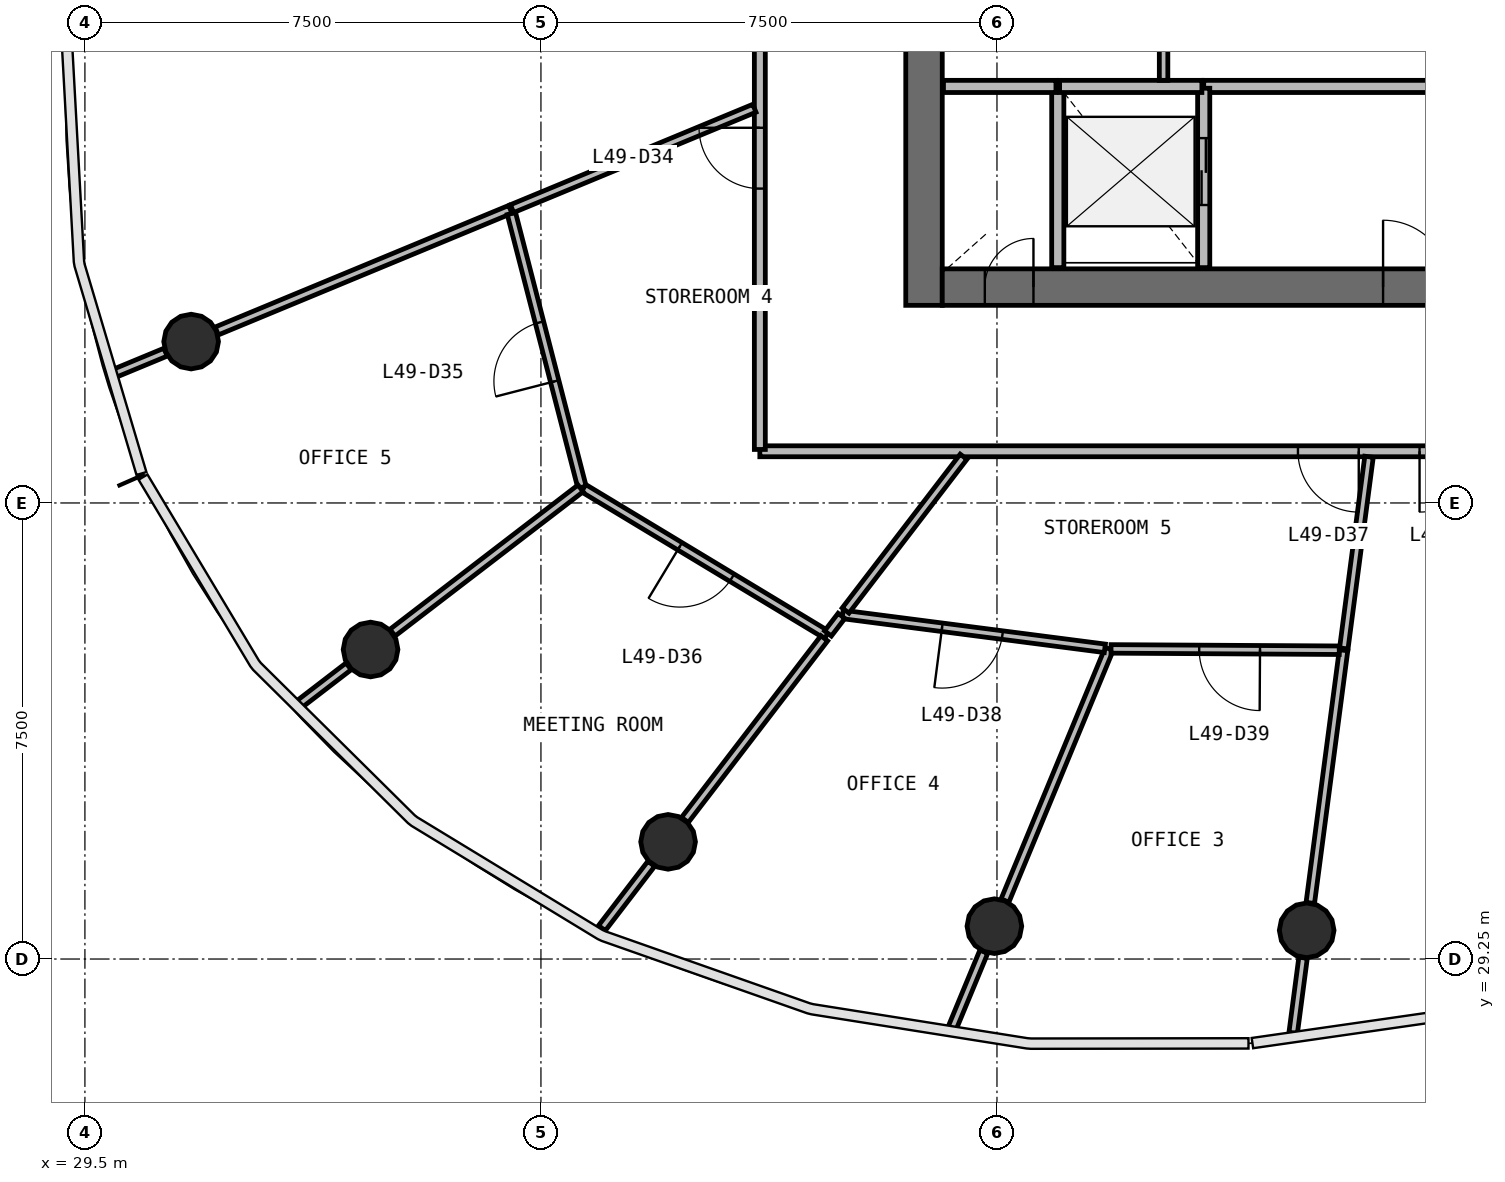
"""IFC4 building model, lengths in metres.
Left out: names, types, materials, properties, quantities, classifications, styles, units other than length and angle.
Written with IfcOpenShell. Run it as: python <this file> out.ifc"""

import sys

from ifc_helpers import new_model, si_unit, direction, frame, frame_2d, origin, origin_2d, place, context, subcontext, project, spatial, rectangle, circle, extrude, source, transform, mapped, element, fill, save


model = new_model("IFC4")
c1 = context("Model", 3, precision=1e-05, world=origin(), true_north=direction((0.0, 1.0)))
c2 = subcontext(c1, "Body", "Model", "MODEL_VIEW")
j1 = project(units=[si_unit("LENGTHUNIT", "METRE"), si_unit("PLANEANGLEUNIT", "RADIAN")], contexts=[c1])
p1 = place(None, origin())
s1 = spatial("IfcSite", under=j1, at=p1, CompositionType="ELEMENT")
p2 = place(p1, origin())
s2 = spatial("IfcBuilding", under=s1, at=p2, CompositionType="ELEMENT")
p3 = place(p2, frame((0.0, 0.0, 203.3)))
s3 = spatial("IfcBuildingStorey", under=s2, at=p3, CompositionType="ELEMENT", Elevation=203.3)
p4 = place(p3, frame((43.3, 56.0, 0.0), z_axis=(0.0, 0.0, 1.0), x_axis=(0.0, -1.0, 0.0)))
e1 = element("IfcWall", 1, at=p4, inside=s3, PredefinedType="SHEAR", context=c2, shape_type="SweptSolid", body=[
    extrude(rectangle(XDim=16.0, YDim=0.6, at=frame_2d((8.0, 0.0))), origin(), (0.0, 0.0, 1.0), 3.9),
])
p5 = place(p4, frame((7.1, 0.0, 0.0)))
e2 = element("IfcOpeningElement", 2, at=p5, cuts=e1, PredefinedType="OPENING", context=c2, shape_type="SweptSolid", body=[
    extrude(rectangle(XDim=1.8, YDim=2.1, at=frame_2d((0.9, 1.05))), frame((0.0, 0.31, 0.0), z_axis=(0.0, -1.0, 0.0), x_axis=(1.0, 0.0, 0.0)), (0.0, 0.0, 1.0), 0.62),
])
p6 = place(p3, frame((43.6, 40.3, 0.0), z_axis=(0.0, 0.0, 1.0), x_axis=(1.0, 0.0, 0.0)))
e3 = element("IfcWall", 3, at=p6, inside=s3, PredefinedType="SHEAR", context=c2, shape_type="SweptSolid", body=[
    extrude(rectangle(XDim=16.8, YDim=0.6, at=frame_2d((8.4, 0.0))), origin(), (0.0, 0.0, 1.0), 3.9),
])
p7 = place(p6, frame((10.3, 0.0, 0.0)))
e4 = element("IfcOpeningElement", 4, at=p7, cuts=e3, PredefinedType="OPENING", context=c2, shape_type="SweptSolid", body=[
    extrude(rectangle(XDim=1.2, YDim=2.1, at=frame_2d((0.6, 1.05))), frame((0.0, 0.31, 0.0), z_axis=(0.0, -1.0, 0.0), x_axis=(1.0, 0.0, 0.0)), (0.0, 0.0, 1.0), 0.62),
])
p8 = place(p6, frame((7.25, 0.0, 0.0)))
e5 = element("IfcOpeningElement", 5, at=p8, cuts=e3, PredefinedType="OPENING", context=c2, shape_type="SweptSolid", body=[
    extrude(rectangle(XDim=1.1, YDim=2.1, at=frame_2d((0.55, 1.05))), frame((0.0, 0.31, 0.0), z_axis=(0.0, -1.0, 0.0), x_axis=(1.0, 0.0, 0.0)), (0.0, 0.0, 1.0), 0.62),
])
p9 = place(p6, frame((0.7, 0.0, 0.0)))
e6 = element("IfcOpeningElement", 6, at=p9, cuts=e3, PredefinedType="OPENING", context=c2, shape_type="SweptSolid", body=[
    extrude(rectangle(XDim=0.8, YDim=2.1, at=frame_2d((0.4, 1.05))), frame((0.0, 0.31, 0.0), z_axis=(0.0, -1.0, 0.0), x_axis=(1.0, 0.0, 0.0)), (0.0, 0.0, 1.0), 0.62),
])
m1 = source(origin(), c2, "Body", "SweptSolid", [
    extrude(circle(Radius=0.45, at=origin_2d()), origin(), (0.0, 0.0, 1.0), 3.9),
])
for number, where, z_axis, x_axis in (
    (7, (31.247, 39.404, 0.0), (0.0, 0.0, 1.0), (1.0, 0.0, 0.0)),
    (8, (34.198, 34.34, 0.0), (0.0, 0.0, 1.0), (1.0, 0.0, 0.0)),
    (9, (39.091, 31.177, 0.0), (0.0, 0.0, 1.0), (1.0, 0.0, 0.0)),
    (10, (44.457, 29.79, 0.0), (0.0, 0.0, 1.0), (1.0, 0.0, 0.0)),
    (11, (49.594, 29.722, 0.0), (0.0, 0.0, 1.0), (1.0, 0.0, 0.0)),
):
    element("IfcColumn", number, at=place(p3, frame(where, z_axis=z_axis, x_axis=x_axis)), inside=s3, PredefinedType="COLUMN", context=c2, shape_type="MappedRepresentation", body=[
        mapped(m1, transform((0.0, 0.0, 0.0), scale=1.0)),
    ])
p10 = place(p3, frame((52.7, 43.6, 0.0), z_axis=(0.0, 0.0, 1.0), x_axis=(-1.0, 0.0, 0.0)))
e12 = element("IfcWall", 12, at=p10, inside=s3, PredefinedType="SOLIDWALL", context=c2, shape_type="SweptSolid", body=[
    extrude(rectangle(XDim=4.8, YDim=0.2, at=frame_2d((2.4, 0.0))), origin(), (0.0, 0.0, 1.0), 3.58),
])
p11 = place(p3, frame((45.5, 43.6, 0.0), z_axis=(0.0, 0.0, 1.0), x_axis=(0.0, -1.0, 0.0)))
e13 = element("IfcWall", 13, at=p11, inside=s3, PredefinedType="SOLIDWALL", context=c2, shape_type="SweptSolid", body=[
    extrude(rectangle(XDim=2.98, YDim=0.2, at=frame_2d((1.49, 0.0))), origin(), (0.0, 0.0, 1.0), 3.58),
])
p12 = place(p3, frame((47.9, 40.62, 0.0), z_axis=(0.0, 0.0, 1.0), x_axis=(0.0, 1.0, 0.0)))
e14 = element("IfcWall", 14, at=p12, inside=s3, PredefinedType="SOLIDWALL", context=c2, shape_type="SweptSolid", body=[
    extrude(rectangle(XDim=2.95, YDim=0.2, at=frame_2d((1.475, 0.0))), origin(), (0.0, 0.0, 1.0), 3.58),
])
p13 = place(p12, frame((1.03, 0.0, 0.0)))
e15 = element("IfcOpeningElement", 15, at=p13, cuts=e14, PredefinedType="OPENING", context=c2, shape_type="SweptSolid", body=[
    extrude(rectangle(XDim=1.1, YDim=2.1, at=frame_2d((0.55, 1.05))), frame((0.0, 0.11, 0.0), z_axis=(0.0, -1.0, 0.0), x_axis=(1.0, 0.0, 0.0)), (0.0, 0.0, 1.0), 0.22),
])
p14 = place(p3, frame((47.87, 43.6, 0.0), z_axis=(0.0, 0.0, 1.0), x_axis=(-1.0, 0.0, 0.0)))
e16 = element("IfcWall", 16, at=p14, inside=s3, PredefinedType="SOLIDWALL", context=c2, shape_type="SweptSolid", body=[
    extrude(rectangle(XDim=2.34, YDim=0.2, at=frame_2d((1.17, 0.0))), origin(), (0.0, 0.0, 1.0), 3.58),
])
p15 = place(p3, frame((45.47, 43.6, 0.0), z_axis=(0.0, 0.0, 1.0), x_axis=(-1.0, 0.0, 0.0)))
e17 = element("IfcWall", 17, at=p15, inside=s3, PredefinedType="SOLIDWALL", context=c2, shape_type="SweptSolid", body=[
    extrude(rectangle(XDim=1.85, YDim=0.2, at=frame_2d((0.925, 0.0))), origin(), (0.0, 0.0, 1.0), 3.58),
])
p16 = place(p3, frame((63.4, 37.6, 0.0), z_axis=(0.0, 0.0, 1.0), x_axis=(-1.0, 0.0, 0.0)))
e18 = element("IfcWall", 18, at=p16, inside=s3, PredefinedType="PARTITIONING", context=c2, shape_type="SweptSolid", body=[
    extrude(rectangle(XDim=22.8, YDim=0.18, at=frame_2d((11.4, 0.0))), origin(), (0.0, 0.0, 1.0), 2.88),
])
p17 = place(p16, frame((12.95, 0.0, 0.0)))
e19 = element("IfcOpeningElement", 19, at=p17, cuts=e18, PredefinedType="OPENING", context=c2, shape_type="SweptSolid", body=[
    extrude(rectangle(XDim=1.0, YDim=2.1, at=frame_2d((0.5, 1.05))), frame((0.0, 0.1, 0.0), z_axis=(0.0, -1.0, 0.0), x_axis=(1.0, 0.0, 0.0)), (0.0, 0.0, 1.0), 0.2),
])
p18 = place(p16, frame((10.95, 0.0, 0.0)))
e20 = element("IfcOpeningElement", 20, at=p18, cuts=e18, PredefinedType="OPENING", context=c2, shape_type="SweptSolid", body=[
    extrude(rectangle(XDim=1.0, YDim=2.1, at=frame_2d((0.5, 1.05))), frame((0.0, 0.1, 0.0), z_axis=(0.0, -1.0, 0.0), x_axis=(1.0, 0.0, 0.0)), (0.0, 0.0, 1.0), 0.2),
])
p19 = place(p16, frame((5.75, 0.0, 0.0)))
e21 = element("IfcOpeningElement", 21, at=p19, cuts=e18, PredefinedType="OPENING", context=c2, shape_type="SweptSolid", body=[
    extrude(rectangle(XDim=1.0, YDim=2.1, at=frame_2d((0.5, 1.05))), frame((0.0, 0.1, 0.0), z_axis=(0.0, -1.0, 0.0), x_axis=(1.0, 0.0, 0.0)), (0.0, 0.0, 1.0), 0.2),
])
p20 = place(p3, frame((40.6, 37.63, 0.0), z_axis=(0.0, 0.0, 1.0), x_axis=(0.0, 1.0, 0.0)))
e22 = element("IfcWall", 22, at=p20, inside=s3, PredefinedType="PARTITIONING", context=c2, shape_type="SweptSolid", body=[
    extrude(rectangle(XDim=20.74, YDim=0.18, at=frame_2d((10.37, 0.0))), origin(), (0.0, 0.0, 1.0), 2.88),
])
p21 = place(p20, frame((9.89, 0.0, 0.0)))
e23 = element("IfcOpeningElement", 23, at=p21, cuts=e22, PredefinedType="OPENING", context=c2, shape_type="SweptSolid", body=[
    extrude(rectangle(XDim=1.0, YDim=2.1, at=frame_2d((0.5, 1.05))), frame((0.0, 0.1, 0.0), z_axis=(0.0, -1.0, 0.0), x_axis=(1.0, 0.0, 0.0)), (0.0, 0.0, 1.0), 0.2),
])
p22 = place(p20, frame((4.29, 0.0, 0.0)))
e24 = element("IfcOpeningElement", 24, at=p22, cuts=e22, PredefinedType="OPENING", context=c2, shape_type="SweptSolid", body=[
    extrude(rectangle(XDim=1.0, YDim=2.1, at=frame_2d((0.5, 1.05))), frame((0.0, 0.1, 0.0), z_axis=(0.0, -1.0, 0.0), x_axis=(1.0, 0.0, 0.0)), (0.0, 0.0, 1.0), 0.2),
])
p23 = place(p3, frame((36.497, 41.578, 0.0), z_axis=(0.0, 0.0, 1.0), x_axis=(-0.923872241602, -0.382701033703, 0.0)))
e25 = element("IfcWall", 25, at=p23, inside=s3, PredefinedType="PARTITIONING", context=c2, shape_type="SweptSolid", body=[
    extrude(rectangle(XDim=5.227, YDim=0.14, at=frame_2d((2.614, 0.0))), origin(), (0.0, 0.0, 1.0), 2.88),
])
p24 = place(p3, frame((37.676, 37.009, 0.0), z_axis=(0.0, 0.0, 1.0), x_axis=(-0.249819251726, 0.968292487561, 0.0)))
e26 = element("IfcWall", 26, at=p24, inside=s3, PredefinedType="PARTITIONING", context=c2, shape_type="SweptSolid", body=[
    extrude(rectangle(XDim=4.649, YDim=0.14, at=frame_2d((2.324, 0.0))), origin(), (0.0, 0.0, 1.0), 2.88),
])
p25 = place(p24, frame((1.799, 0.0, 0.0)))
e27 = element("IfcOpeningElement", 27, at=p25, cuts=e26, PredefinedType="OPENING", context=c2, shape_type="SweptSolid", body=[
    extrude(rectangle(XDim=1.0, YDim=2.1, at=frame_2d((0.5, 1.05))), frame((0.0, 0.08, 0.0), z_axis=(0.0, -1.0, 0.0), x_axis=(1.0, 0.0, 0.0)), (0.0, 0.0, 1.0), 0.16),
])
p26 = place(p3, frame((41.702, 34.58, 0.0), z_axis=(0.0, 0.0, 1.0), x_axis=(-0.856310382511, 0.516461546298, 0.0)))
e28 = element("IfcWall", 28, at=p26, inside=s3, PredefinedType="PARTITIONING", context=c2, shape_type="SweptSolid", body=[
    extrude(rectangle(XDim=4.672, YDim=0.14, at=frame_2d((2.336, 0.0))), origin(), (0.0, 0.0, 1.0), 2.88),
])
p27 = place(p26, frame((1.823, 0.0, 0.0)))
e29 = element("IfcOpeningElement", 29, at=p27, cuts=e28, PredefinedType="OPENING", context=c2, shape_type="SweptSolid", body=[
    extrude(rectangle(XDim=1.0, YDim=2.1, at=frame_2d((0.5, 1.05))), frame((0.0, 0.08, 0.0), z_axis=(0.0, -1.0, 0.0), x_axis=(1.0, 0.0, 0.0)), (0.0, 0.0, 1.0), 0.16),
])
p28 = place(p3, frame((46.346, 34.35, 0.0), z_axis=(0.0, 0.0, 1.0), x_axis=(-0.382683853281, -0.923879358162, 0.0)))
e30 = element("IfcWall", 30, at=p28, inside=s3, PredefinedType="PARTITIONING", context=c2, shape_type="SweptSolid", body=[
    extrude(rectangle(XDim=4.48, YDim=0.14, at=frame_2d((2.24, 0.0))), origin(), (0.0, 0.0, 1.0), 2.88),
])
p29 = place(p3, frame((40.51, 43.241, 0.0), z_axis=(0.0, 0.0, 1.0), x_axis=(-0.923880260939, -0.382681673781, 0.0)))
e31 = element("IfcWall", 31, at=p29, inside=s3, PredefinedType="PARTITIONING", context=c2, shape_type="SweptSolid", body=[
    extrude(rectangle(XDim=4.314, YDim=0.14, at=frame_2d((2.157, 0.0))), origin(), (0.0, 0.0, 1.0), 2.88),
])
p30 = place(p3, frame((46.274, 34.359, 0.0), z_axis=(0.0, 0.0, 1.0), x_axis=(-0.991745657541, 0.128220711073, 0.0)))
e32 = element("IfcWall", 32, at=p30, inside=s3, PredefinedType="PARTITIONING", context=c2, shape_type="SweptSolid", body=[
    extrude(rectangle(XDim=4.349, YDim=0.14, at=frame_2d((2.174, 0.0))), origin(), (0.0, 0.0, 1.0), 2.88),
])
p31 = place(p30, frame((1.699, 0.0, 0.0)))
e33 = element("IfcOpeningElement", 33, at=p31, cuts=e32, PredefinedType="OPENING", context=c2, shape_type="SweptSolid", body=[
    extrude(rectangle(XDim=1.0, YDim=2.1, at=frame_2d((0.5, 1.05))), frame((0.0, 0.08, 0.0), z_axis=(0.0, -1.0, 0.0), x_axis=(1.0, 0.0, 0.0)), (0.0, 0.0, 1.0), 0.16),
])
p32 = place(p3, frame((50.2, 34.328, 0.0), z_axis=(0.0, 0.0, 1.0), x_axis=(-0.130534370564, -0.99144378464, 0.0)))
e34 = element("IfcWall", 34, at=p32, inside=s3, PredefinedType="PARTITIONING", context=c2, shape_type="SweptSolid", body=[
    extrude(rectangle(XDim=4.191, YDim=0.14, at=frame_2d((2.096, 0.0))), origin(), (0.0, 0.0, 1.0), 2.88),
])
p33 = place(p3, frame((37.652, 36.99, 0.0), z_axis=(0.0, 0.0, 1.0), x_axis=(-0.793347300472, -0.608769300173, 0.0)))
e35 = element("IfcWall", 35, at=p33, inside=s3, PredefinedType="PARTITIONING", context=c2, shape_type="SweptSolid", body=[
    extrude(rectangle(XDim=3.899, YDim=0.14, at=frame_2d((1.95, 0.0))), origin(), (0.0, 0.0, 1.0), 2.88),
])
p34 = place(p3, frame((50.129, 34.328, 0.0), z_axis=(0.0, 0.0, 1.0), x_axis=(-0.999983244193, 0.005788897407, 0.0)))
e36 = element("IfcWall", 36, at=p34, inside=s3, PredefinedType="PARTITIONING", context=c2, shape_type="SweptSolid", body=[
    extrude(rectangle(XDim=3.753, YDim=0.14, at=frame_2d((1.877, 0.0))), origin(), (0.0, 0.0, 1.0), 2.88),
])
p35 = place(p34, frame((1.303, 0.0, 0.0)))
e37 = element("IfcOpeningElement", 37, at=p35, cuts=e36, PredefinedType="OPENING", context=c2, shape_type="SweptSolid", body=[
    extrude(rectangle(XDim=1.0, YDim=2.1, at=frame_2d((0.5, 1.05))), frame((0.0, 0.08, 0.0), z_axis=(0.0, -1.0, 0.0), x_axis=(1.0, 0.0, 0.0)), (0.0, 0.0, 1.0), 0.16),
])
p36 = place(p3, frame((41.66, 34.524, 0.0), z_axis=(0.0, 0.0, 1.0), x_axis=(-0.60877322383, -0.793344289667, 0.0)))
e38 = element("IfcWall", 38, at=p36, inside=s3, PredefinedType="PARTITIONING", context=c2, shape_type="SweptSolid", body=[
    extrude(rectangle(XDim=3.765, YDim=0.14, at=frame_2d((1.882, 0.0))), origin(), (0.0, 0.0, 1.0), 2.88),
])
p37 = place(p3, frame((41.943, 34.893, 0.0), z_axis=(0.0, 0.0, 1.0), x_axis=(-0.608740457709, -0.793369431695, 0.0)))
e39 = element("IfcWall", 39, at=p37, inside=s3, PredefinedType="PARTITIONING", context=c2, shape_type="SweptSolid", body=[
    extrude(rectangle(XDim=0.365, YDim=0.14, at=frame_2d((0.183, 0.0))), origin(), (0.0, 0.0, 1.0), 2.88),
])
p38 = place(p3, frame((43.951, 37.51, 0.0), z_axis=(0.0, 0.0, 1.0), x_axis=(-0.60871452172, -0.793389331317, 0.0)))
e40 = element("IfcWall", 40, at=p38, inside=s3, PredefinedType="PARTITIONING", context=c2, shape_type="SweptSolid", body=[
    extrude(rectangle(XDim=3.187, YDim=0.14, at=frame_2d((1.594, 0.0))), origin(), (0.0, 0.0, 1.0), 2.88),
])
p39 = place(p3, frame((50.619, 37.51, 0.0), z_axis=(0.0, 0.0, 1.0), x_axis=(-0.130524026108, -0.991445146546, 0.0)))
e41 = element("IfcWall", 41, at=p39, inside=s3, PredefinedType="PARTITIONING", context=c2, shape_type="SweptSolid", body=[
    extrude(rectangle(XDim=3.18, YDim=0.14, at=frame_2d((1.59, 0.0))), origin(), (0.0, 0.0, 1.0), 2.88),
])
p40 = place(p3, frame((47.24, 43.7, 0.0), z_axis=(0.0, 0.0, 1.0), x_axis=(0.0, 1.0, 0.0)))
e42 = element("IfcWall", 42, at=p40, inside=s3, PredefinedType="PARTITIONING", context=c2, shape_type="SweptSolid", body=[
    extrude(rectangle(XDim=2.29, YDim=0.14, at=frame_2d((1.145, 0.0))), origin(), (0.0, 0.0, 1.0), 2.88),
])
p41 = place(p3, frame((44.283, 29.37, 0.0), z_axis=(0.0, 0.0, 1.0), x_axis=(-0.382733825207, -0.923858657502, 0.0)))
e43 = element("IfcWall", 43, at=p41, inside=s3, PredefinedType="PARTITIONING", context=c2, shape_type="SweptSolid", body=[
    extrude(rectangle(XDim=1.373, YDim=0.14, at=frame_2d((0.687, 0.0))), origin(), (0.0, 0.0, 1.0), 2.88),
])
p42 = place(p3, frame((38.814, 30.816, 0.0), z_axis=(0.0, 0.0, 1.0), x_axis=(-0.608692849826, -0.79340595824, 0.0)))
e44 = element("IfcWall", 44, at=p42, inside=s3, PredefinedType="PARTITIONING", context=c2, shape_type="SweptSolid", body=[
    extrude(rectangle(XDim=1.334, YDim=0.14, at=frame_2d((0.667, 0.0))), origin(), (0.0, 0.0, 1.0), 2.88),
])
p43 = place(p3, frame((49.534, 29.271, 0.0), z_axis=(0.0, 0.0, 1.0), x_axis=(-0.130520415919, -0.991445621821, 0.0)))
e45 = element("IfcWall", 45, at=p43, inside=s3, PredefinedType="PARTITIONING", context=c2, shape_type="SweptSolid", body=[
    extrude(rectangle(XDim=1.246, YDim=0.14, at=frame_2d((0.623, 0.0))), origin(), (0.0, 0.0, 1.0), 2.88),
])
p44 = place(p3, frame((33.837, 34.063, 0.0), z_axis=(0.0, 0.0, 1.0), x_axis=(-0.793403619358, -0.608695898449, 0.0)))
e46 = element("IfcWall", 46, at=p44, inside=s3, PredefinedType="PARTITIONING", context=c2, shape_type="SweptSolid", body=[
    extrude(rectangle(XDim=1.047, YDim=0.14, at=frame_2d((0.523, 0.0))), origin(), (0.0, 0.0, 1.0), 2.88),
])
p45 = place(p3, frame((30.826, 39.23, 0.0), z_axis=(0.0, 0.0, 1.0), x_axis=(-0.923779659408, -0.38292445843, 0.0)))
e47 = element("IfcWall", 47, at=p45, inside=s3, PredefinedType="PARTITIONING", context=c2, shape_type="SweptSolid", body=[
    extrude(rectangle(XDim=0.954, YDim=0.14, at=frame_2d((0.477, 0.0))), origin(), (0.0, 0.0, 1.0), 2.88),
])
m2 = source(origin(), c2, "Body", "SweptSolid", [
    extrude(rectangle(XDim=1.1, YDim=2.1, at=frame_2d((0.55, 1.05))), frame((0.0, 0.025, 0.0), z_axis=(0.0, -1.0, 0.0), x_axis=(1.0, 0.0, 0.0)), (0.0, 0.0, 1.0), 0.05),
])
p46 = place(p13, origin())
e48 = element("IfcDoor", 48, at=p46, inside=s3, OperationType="DOUBLE_DOOR_SLIDING", PredefinedType="USERDEFINED", context=c2, shape_type="MappedRepresentation", body=[
    mapped(m2, transform((0.0, 0.0, 0.0), scale=1.0)),
])
fill(e15, e48)
m3 = source(origin(), c2, "Body", "SweptSolid", [
    extrude(rectangle(XDim=1.1, YDim=2.1, at=frame_2d((0.55, 1.05))), frame((0.0, 0.025, 0.0), z_axis=(0.0, -1.0, 0.0), x_axis=(1.0, 0.0, 0.0)), (0.0, 0.0, 1.0), 0.05),
])
p47 = place(p8, origin())
e49 = element("IfcDoor", 49, at=p47, inside=s3, OperationType="SINGLE_SWING_LEFT", PredefinedType="DOOR", context=c2, shape_type="MappedRepresentation", body=[
    mapped(m3, transform((0.0, 0.0, 0.0), scale=1.0)),
])
fill(e5, e49)
m4 = source(origin(), c2, "Body", "SweptSolid", [
    extrude(rectangle(XDim=0.8, YDim=2.1, at=frame_2d((0.4, 1.05))), frame((0.0, 0.025, 0.0), z_axis=(0.0, -1.0, 0.0), x_axis=(1.0, 0.0, 0.0)), (0.0, 0.0, 1.0), 0.05),
])
p48 = place(p9, origin())
e50 = element("IfcDoor", 50, at=p48, inside=s3, OperationType="SINGLE_SWING_RIGHT", PredefinedType="DOOR", context=c2, shape_type="MappedRepresentation", body=[
    mapped(m4, transform((0.0, 0.0, 0.0), scale=1.0)),
])
fill(e6, e50)
m5 = source(origin(), c2, "Body", "SweptSolid", [
    extrude(rectangle(XDim=1.0, YDim=2.1, at=frame_2d((0.5, 1.05))), frame((0.0, 0.025, 0.0), z_axis=(0.0, -1.0, 0.0), x_axis=(1.0, 0.0, 0.0)), (0.0, 0.0, 1.0), 0.05),
])
p49 = place(p22, origin())
e51 = element("IfcDoor", 51, at=p49, inside=s3, OperationType="SINGLE_SWING_RIGHT", PredefinedType="DOOR", context=c2, shape_type="MappedRepresentation", body=[
    mapped(m5, transform((0.0, 0.0, 0.0), scale=1.0)),
])
fill(e24, e51)
p50 = place(p25, origin())
e52 = element("IfcDoor", 52, at=p50, inside=s3, OperationType="SINGLE_SWING_LEFT", PredefinedType="DOOR", context=c2, shape_type="MappedRepresentation", body=[
    mapped(m5, transform((0.0, 0.0, 0.0), scale=1.0)),
])
fill(e27, e52)
p51 = place(p27, origin())
e53 = element("IfcDoor", 53, at=p51, inside=s3, OperationType="SINGLE_SWING_RIGHT", PredefinedType="DOOR", context=c2, shape_type="MappedRepresentation", body=[
    mapped(m5, transform((0.0, 0.0, 0.0), scale=1.0)),
])
fill(e29, e53)
p52 = place(p17, origin())
e54 = element("IfcDoor", 54, at=p52, inside=s3, OperationType="SINGLE_SWING_LEFT", PredefinedType="DOOR", context=c2, shape_type="MappedRepresentation", body=[
    mapped(m5, transform((0.0, 0.0, 0.0), scale=1.0)),
])
fill(e19, e54)
p53 = place(p31, origin())
e55 = element("IfcDoor", 55, at=p53, inside=s3, OperationType="SINGLE_SWING_RIGHT", PredefinedType="DOOR", context=c2, shape_type="MappedRepresentation", body=[
    mapped(m5, transform((0.0, 0.0, 0.0), scale=1.0)),
])
fill(e33, e55)
p54 = place(p35, origin())
e56 = element("IfcDoor", 56, at=p54, inside=s3, OperationType="SINGLE_SWING_LEFT", PredefinedType="DOOR", context=c2, shape_type="MappedRepresentation", body=[
    mapped(m5, transform((0.0, 0.0, 0.0), scale=1.0)),
])
fill(e37, e56)
p55 = place(p18, origin())
e57 = element("IfcDoor", 57, at=p55, inside=s3, OperationType="SINGLE_SWING_RIGHT", PredefinedType="DOOR", context=c2, shape_type="MappedRepresentation", body=[
    mapped(m5, transform((0.0, 0.0, 0.0), scale=1.0)),
])
fill(e20, e57)
save(model, sys.argv[1])
